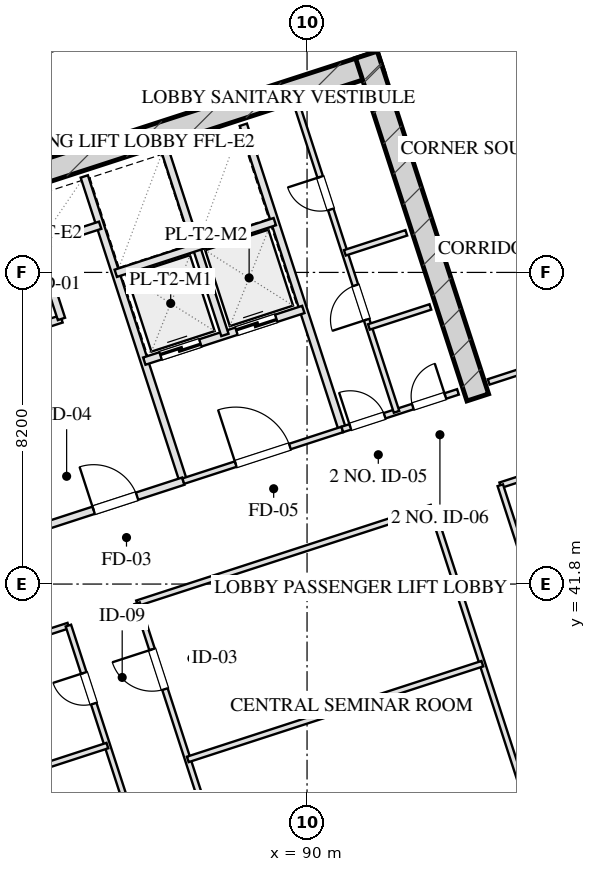
"""IFC4 building model, lengths in metres.
Left out: names, types, materials, properties, quantities, classifications, styles, units other than length and angle.
Written with IfcOpenShell. Run it as: python <this file> out.ifc"""

import sys

from ifc_helpers import new_model, si_unit, direction, frame, frame_2d, origin, origin_2d, place, context, subcontext, project, spatial, rectangle, hollow_rectangle, extrude, element, fill, save


model = new_model("IFC4")
c1 = context("Model", 3, precision=1e-05, world=origin(), true_north=direction((0.0, 1.0)))
c2 = subcontext(c1, "Body", "Model", "MODEL_VIEW")
j1 = project(units=[si_unit("LENGTHUNIT", "METRE"), si_unit("PLANEANGLEUNIT", "RADIAN")], contexts=[c1])
p1 = place(None, origin())
s1 = spatial("IfcSite", under=j1, at=p1, CompositionType="ELEMENT")
p2 = place(p1, origin())
s2 = spatial("IfcBuilding", under=s1, at=p2, CompositionType="ELEMENT")
p3 = place(p2, frame((0.0, 0.0, 180.55)))
s3 = spatial("IfcBuildingStorey", under=s2, at=p3, CompositionType="ELEMENT", Elevation=180.55)
p4 = place(p3, frame((76.344, 50.466, 0.0), z_axis=(0.0, 0.0, 1.0), x_axis=(0.951055727519, 0.309019421968, 0.0)))
e1 = element("IfcWall", 1, at=p4, inside=s3, PredefinedType="SHEAR", context=c2, shape_type="SweptSolid", body=[
    extrude(rectangle(XDim=16.4, YDim=0.6, at=frame_2d((8.2, 0.0))), origin(), (0.0, 0.0, 1.0), 3.45),
])
p5 = place(p3, frame((94.492, 46.71, 0.0), z_axis=(0.0, 0.0, 1.0), x_axis=(-0.309010370028, 0.95105866865, 0.0)))
e2 = element("IfcWall", 2, at=p5, inside=s3, PredefinedType="SHEAR", context=c2, shape_type="SweptSolid", body=[
    extrude(rectangle(XDim=9.48, YDim=0.6, at=frame_2d((4.74, 0.0))), origin(), (0.0, 0.0, 1.0), 3.45),
])
p6 = place(p3, frame((82.815, 56.112, 0.0), z_axis=(0.0, 0.0, 1.0), x_axis=(0.951056516295, 0.309016994375, 0.0)))
e3 = element("IfcColumn", 3, at=p6, inside=s3, PredefinedType="COLUMN", context=c2, shape_type="SweptSolid", body=[
    extrude(hollow_rectangle(XDim=0.8, YDim=0.8, WallThickness=0.028, at=origin_2d()), origin(), (0.0, 0.0, 1.0), 3.451),
])
p7 = place(p3, frame((70.092, 52.556, 0.0), z_axis=(0.0, 0.0, 1.0), x_axis=(0.951057580055, 0.30901372044, 0.0)))
e4 = element("IfcWall", 4, at=p7, inside=s3, PredefinedType="SOLIDWALL", context=c2, shape_type="SweptSolid", body=[
    extrude(rectangle(XDim=26.4, YDim=0.4, at=frame_2d((13.2, 0.0))), origin(), (0.0, 0.0, 1.0), 2.55),
])
p8 = place(p3, frame((86.743, 44.508, 0.0), z_axis=(0.0, 0.0, 1.0), x_axis=(-0.309016001439, 0.951056838919, 0.0)))
e5 = element("IfcWall", 5, at=p8, inside=s3, PredefinedType="PARTITIONING", context=c2, shape_type="SweptSolid", body=[
    extrude(rectangle(XDim=8.43, YDim=0.2, at=frame_2d((4.215, 0.0))), origin(), (0.0, 0.0, 1.0), 3.155),
])
p9 = place(p3, frame((83.101, 43.324, 0.0), z_axis=(0.0, 0.0, 1.0), x_axis=(0.951052804469, 0.309028417967, 0.0)))
e6 = element("IfcWall", 6, at=p9, inside=s3, PredefinedType="PARTITIONING", context=c2, shape_type="SweptSolid", body=[
    extrude(rectangle(XDim=3.83, YDim=0.2, at=frame_2d((1.915, 0.0))), origin(), (0.0, 0.0, 1.0), 3.155),
])
p10 = place(p9, frame((1.35, 0.0, 0.0)))
e7 = element("IfcOpeningElement", 7, at=p10, cuts=e6, PredefinedType="OPENING", context=c2, shape_type="SweptSolid", body=[
    extrude(rectangle(XDim=1.2, YDim=2.05, at=frame_2d((0.6, 1.025))), frame((0.0, 0.11, 0.0), z_axis=(0.0, -1.0, 0.0), x_axis=(1.0, 0.0, 0.0)), (0.0, 0.0, 1.0), 0.22),
])
p11 = place(p3, frame((81.54, 48.127, 0.0), z_axis=(0.0, 0.0, 1.0), x_axis=(0.951062257173, 0.308999325213, 0.0)))
e8 = element("IfcWall", 8, at=p11, inside=s3, PredefinedType="PARTITIONING", context=c2, shape_type="SweptSolid", body=[
    extrude(rectangle(XDim=2.1, YDim=0.2, at=frame_2d((1.05, 0.0))), origin(), (0.0, 0.0, 1.0), 3.155),
])
p12 = place(p11, frame((0.35, 0.0, 0.0)))
e9 = element("IfcOpeningElement", 9, at=p12, cuts=e8, PredefinedType="OPENING", context=c2, shape_type="SweptSolid", body=[
    extrude(rectangle(XDim=1.1, YDim=2.05, at=frame_2d((0.55, 1.025))), frame((0.0, 0.11, 0.0), z_axis=(0.0, -1.0, 0.0), x_axis=(1.0, 0.0, 0.0)), (0.0, 0.0, 1.0), 0.22),
])
p13 = place(p3, frame((83.538, 48.776, 0.0), z_axis=(0.0, 0.0, 1.0), x_axis=(-0.3089935693, 0.951064127245, 0.0)))
e10 = element("IfcWall", 10, at=p13, inside=s3, PredefinedType="PARTITIONING", context=c2, shape_type="SweptSolid", body=[
    extrude(rectangle(XDim=3.7, YDim=0.2, at=frame_2d((1.85, 0.0))), origin(), (0.0, 0.0, 1.0), 3.155),
])
p14 = place(p3, frame((82.91, 50.707, 0.0), z_axis=(0.0, 0.0, 1.0), x_axis=(0.951041328149, 0.309063734775, 0.0)))
e11 = element("IfcWall", 11, at=p14, inside=s3, PredefinedType="PARTITIONING", context=c2, shape_type="SweptSolid", body=[
    extrude(rectangle(XDim=1.73, YDim=0.2, at=frame_2d((0.865, 0.0))), origin(), (0.0, 0.0, 1.0), 3.155),
])
p15 = place(p3, frame((90.928, 45.868, 0.0), z_axis=(0.0, 0.0, 1.0), x_axis=(-0.309042196757, 0.951048327176, 0.0)))
e12 = element("IfcWall", 12, at=p15, inside=s3, PredefinedType="PARTITIONING", context=c2, shape_type="SweptSolid", body=[
    extrude(rectangle(XDim=8.43, YDim=0.2, at=frame_2d((4.215, 0.0))), origin(), (0.0, 0.0, 1.0), 3.155),
])
p16 = place(p3, frame((86.743, 44.508, 0.0), z_axis=(0.0, 0.0, 1.0), x_axis=(0.951063829732, 0.308994485023, 0.0)))
e13 = element("IfcWall", 13, at=p16, inside=s3, PredefinedType="PARTITIONING", context=c2, shape_type="SweptSolid", body=[
    extrude(rectangle(XDim=4.4, YDim=0.15, at=frame_2d((2.2, 0.0))), origin(), (0.0, 0.0, 1.0), 3.155),
])
p17 = place(p16, frame((1.45, 0.0, 0.0)))
e14 = element("IfcOpeningElement", 14, at=p17, cuts=e13, PredefinedType="OPENING", context=c2, shape_type="SweptSolid", body=[
    extrude(rectangle(XDim=1.5, YDim=2.05, at=frame_2d((0.75, 1.025))), frame((0.0, 0.085, 0.0), z_axis=(0.0, -1.0, 0.0), x_axis=(1.0, 0.0, 0.0)), (0.0, 0.0, 1.0), 0.17),
])
p18 = place(p3, frame((85.718, 47.666, 0.0), z_axis=(0.0, 0.0, 1.0), x_axis=(0.951058531764, 0.30901079133, 0.0)))
e15 = element("IfcWall", 15, at=p18, inside=s3, PredefinedType="PARTITIONING", context=c2, shape_type="SweptSolid", body=[
    extrude(rectangle(XDim=4.4, YDim=0.2, at=frame_2d((2.2, 0.0))), origin(), (0.0, 0.0, 1.0), 3.155),
])
p19 = place(p18, frame((0.45, 0.0, 0.0)))
e16 = element("IfcOpeningElement", 16, at=p19, cuts=e15, PredefinedType="OPENING", context=c2, shape_type="SweptSolid", body=[
    extrude(rectangle(XDim=1.1, YDim=2.05, at=frame_2d((0.55, 1.025))), frame((0.0, 0.11, 0.0), z_axis=(0.0, -1.0, 0.0), x_axis=(1.0, 0.0, 0.0)), (0.0, 0.0, 1.0), 0.22),
])
p20 = place(p18, frame((2.55, 0.0, 0.0)))
e17 = element("IfcOpeningElement", 17, at=p20, cuts=e15, PredefinedType="OPENING", context=c2, shape_type="SweptSolid", body=[
    extrude(rectangle(XDim=1.1, YDim=2.05, at=frame_2d((0.55, 1.025))), frame((0.0, 0.11, 0.0), z_axis=(0.0, -1.0, 0.0), x_axis=(1.0, 0.0, 0.0)), (0.0, 0.0, 1.0), 0.22),
])
p21 = place(p3, frame((87.838, 48.354, 0.0), z_axis=(0.0, 0.0, 1.0), x_axis=(-0.3090093719, 0.951058992953, 0.0)))
e18 = element("IfcWall", 18, at=p21, inside=s3, PredefinedType="PARTITIONING", context=c2, shape_type="SweptSolid", body=[
    extrude(rectangle(XDim=5.11, YDim=0.2, at=frame_2d((2.555, 0.0))), origin(), (0.0, 0.0, 1.0), 3.155),
])
p22 = place(p3, frame((84.967, 49.977, 0.0), z_axis=(0.0, 0.0, 1.0), x_axis=(0.951063829732, 0.308994485023, 0.0)))
e19 = element("IfcWall", 19, at=p22, inside=s3, PredefinedType="PARTITIONING", context=c2, shape_type="SweptSolid", body=[
    extrude(rectangle(XDim=4.4, YDim=0.2, at=frame_2d((2.2, 0.0))), origin(), (0.0, 0.0, 1.0), 3.155),
])
p23 = place(p3, frame((90.928, 45.868, 0.0), z_axis=(0.0, 0.0, 1.0), x_axis=(0.951059297078, 0.309008435874, 0.0)))
e20 = element("IfcWall", 20, at=p23, inside=s3, PredefinedType="PARTITIONING", context=c2, shape_type="SweptSolid", body=[
    extrude(rectangle(XDim=3.2, YDim=0.15, at=frame_2d((1.6, 0.0))), origin(), (0.0, 0.0, 1.0), 3.155),
])
p24 = place(p23, frame((0.22, 0.0, 0.0)))
e21 = element("IfcOpeningElement", 21, at=p24, cuts=e20, PredefinedType="OPENING", context=c2, shape_type="SweptSolid", body=[
    extrude(rectangle(XDim=0.95, YDim=2.05, at=frame_2d((0.475, 1.025))), frame((0.0, 0.085, 0.0), z_axis=(0.0, -1.0, 0.0), x_axis=(1.0, 0.0, 0.0)), (0.0, 0.0, 1.0), 0.17),
])
p25 = place(p23, frame((1.95, 0.0, 0.0)))
e22 = element("IfcOpeningElement", 22, at=p25, cuts=e20, PredefinedType="OPENING", context=c2, shape_type="SweptSolid", body=[
    extrude(rectangle(XDim=0.9, YDim=2.05, at=frame_2d((0.45, 1.025))), frame((0.0, 0.085, 0.0), z_axis=(0.0, -1.0, 0.0), x_axis=(1.0, 0.0, 0.0)), (0.0, 0.0, 1.0), 0.17),
])
p26 = place(p3, frame((92.355, 46.331, 0.0), z_axis=(0.0, 0.0, 1.0), x_axis=(-0.309007490203, 0.951059604335, 0.0)))
e23 = element("IfcWall", 23, at=p26, inside=s3, PredefinedType="PARTITIONING", context=c2, shape_type="SweptSolid", body=[
    extrude(rectangle(XDim=8.43, YDim=0.15, at=frame_2d((4.215, 0.0))), origin(), (0.0, 0.0, 1.0), 3.155),
])
p27 = place(p26, frame((2.55, 0.0, 0.0)))
e24 = element("IfcOpeningElement", 24, at=p27, cuts=e23, PredefinedType="OPENING", context=c2, shape_type="SweptSolid", body=[
    extrude(rectangle(XDim=0.95, YDim=2.05, at=frame_2d((0.475, 1.025))), frame((0.0, 0.085, 0.0), z_axis=(0.0, -1.0, 0.0), x_axis=(1.0, 0.0, 0.0)), (0.0, 0.0, 1.0), 0.17),
])
p28 = place(p26, frame((5.6, 0.0, 0.0)))
e25 = element("IfcOpeningElement", 25, at=p28, cuts=e23, PredefinedType="OPENING", context=c2, shape_type="SweptSolid", body=[
    extrude(rectangle(XDim=0.9, YDim=2.05, at=frame_2d((0.45, 1.025))), frame((0.0, 0.085, 0.0), z_axis=(0.0, -1.0, 0.0), x_axis=(1.0, 0.0, 0.0)), (0.0, 0.0, 1.0), 0.17),
])
p29 = place(p3, frame((90.995, 50.516, 0.0), z_axis=(0.0, 0.0, 1.0), x_axis=(0.951040401051, 0.309066587596, 0.0)))
e26 = element("IfcWall", 26, at=p29, inside=s3, PredefinedType="PARTITIONING", context=c2, shape_type="SweptSolid", body=[
    extrude(rectangle(XDim=1.7, YDim=0.15, at=frame_2d((0.85, 0.0))), origin(), (0.0, 0.0, 1.0), 3.155),
])
p30 = place(p3, frame((91.628, 48.566, 0.0), z_axis=(0.0, 0.0, 1.0), x_axis=(0.951054116971, 0.309024378638, 0.0)))
e27 = element("IfcWall", 27, at=p30, inside=s3, PredefinedType="PARTITIONING", context=c2, shape_type="SweptSolid", body=[
    extrude(rectangle(XDim=1.7, YDim=0.15, at=frame_2d((0.85, 0.0))), origin(), (0.0, 0.0, 1.0), 3.155),
])
p31 = place(p3, frame((94.78, 47.119, 0.0), z_axis=(0.0, 0.0, 1.0), x_axis=(0.951057811516, 0.309013008068, 0.0)))
e28 = element("IfcWall", 28, at=p31, inside=s3, PredefinedType="PARTITIONING", context=c2, shape_type="SweptSolid", body=[
    extrude(rectangle(XDim=6.8, YDim=0.15, at=frame_2d((3.4, 0.0))), origin(), (0.0, 0.0, 1.0), 3.155),
])
p32 = place(p31, frame((2.856, 0.0, 0.0)))
e29 = element("IfcOpeningElement", 29, at=p32, cuts=e28, PredefinedType="OPENING", context=c2, shape_type="SweptSolid", body=[
    extrude(rectangle(XDim=1.0, YDim=2.05, at=frame_2d((0.5, 1.025))), frame((0.0, 0.085, 0.0), z_axis=(0.0, -1.0, 0.0), x_axis=(1.0, 0.0, 0.0)), (0.0, 0.0, 1.0), 0.17),
])
p33 = place(p3, frame((72.783, 37.154, 0.0), z_axis=(0.0, 0.0, 1.0), x_axis=(0.951056999652, 0.309015506751, 0.0)))
e30 = element("IfcWall", 30, at=p33, inside=s3, PredefinedType="PARTITIONING", context=c2, shape_type="SweptSolid", body=[
    extrude(rectangle(XDim=11.5, YDim=0.15, at=frame_2d((5.75, 0.0))), origin(), (0.0, 0.0, 1.0), 3.155),
])
p34 = place(p3, frame((85.527, 41.295, 0.0), z_axis=(0.0, 0.0, 1.0), x_axis=(0.951055419664, 0.309020369437, 0.0)))
e31 = element("IfcWall", 31, at=p34, inside=s3, PredefinedType="PARTITIONING", context=c2, shape_type="SweptSolid", body=[
    extrude(rectangle(XDim=8.15, YDim=0.15, at=frame_2d((4.075, 0.0))), origin(), (0.0, 0.0, 1.0), 3.155),
])
p35 = place(p3, frame((95.085, 44.4, 0.0), z_axis=(0.0, 0.0, 1.0), x_axis=(0.95105749975, 0.309013967595, 0.0)))
e32 = element("IfcWall", 32, at=p35, inside=s3, PredefinedType="PARTITIONING", context=c2, shape_type="SweptSolid", body=[
    extrude(rectangle(XDim=7.35, YDim=0.15, at=frame_2d((3.675, 0.0))), origin(), (0.0, 0.0, 1.0), 3.155),
])
p36 = place(p3, frame((88.862, 24.882, 0.0), z_axis=(0.0, 0.0, 1.0), x_axis=(-0.309008771245, 0.951059188113, 0.0)))
e33 = element("IfcWall", 33, at=p36, inside=s3, PredefinedType="PARTITIONING", context=c2, shape_type="SweptSolid", body=[
    extrude(rectangle(XDim=16.64, YDim=0.15, at=frame_2d((8.32, 0.0))), origin(), (0.0, 0.0, 1.0), 3.155),
])
p37 = place(p36, frame((1.16, 0.0, 0.0)))
e34 = element("IfcOpeningElement", 34, at=p37, cuts=e33, PredefinedType="OPENING", context=c2, shape_type="SweptSolid", body=[
    extrude(rectangle(XDim=1.0, YDim=2.05, at=frame_2d((0.5, 1.025))), frame((0.0, 0.085, 0.0), z_axis=(0.0, -1.0, 0.0), x_axis=(1.0, 0.0, 0.0)), (0.0, 0.0, 1.0), 0.17),
])
p38 = place(p36, frame((5.48, 0.0, 0.0)))
e35 = element("IfcOpeningElement", 35, at=p38, cuts=e33, PredefinedType="OPENING", context=c2, shape_type="SweptSolid", body=[
    extrude(rectangle(XDim=1.05, YDim=2.05, at=frame_2d((0.525, 1.025))), frame((0.0, 0.085, 0.0), z_axis=(0.0, -1.0, 0.0), x_axis=(1.0, 0.0, 0.0)), (0.0, 0.0, 1.0), 0.17),
])
p39 = place(p36, frame((8.08, 0.0, 0.0)))
e36 = element("IfcOpeningElement", 36, at=p39, cuts=e33, PredefinedType="OPENING", context=c2, shape_type="SweptSolid", body=[
    extrude(rectangle(XDim=1.0, YDim=2.05, at=frame_2d((0.5, 1.025))), frame((0.0, 0.085, 0.0), z_axis=(0.0, -1.0, 0.0), x_axis=(1.0, 0.0, 0.0)), (0.0, 0.0, 1.0), 0.17),
])
p40 = place(p36, frame((10.92, 0.0, 0.0)))
e37 = element("IfcOpeningElement", 37, at=p40, cuts=e33, PredefinedType="OPENING", context=c2, shape_type="SweptSolid", body=[
    extrude(rectangle(XDim=1.0, YDim=2.05, at=frame_2d((0.5, 1.025))), frame((0.0, 0.085, 0.0), z_axis=(0.0, -1.0, 0.0), x_axis=(1.0, 0.0, 0.0)), (0.0, 0.0, 1.0), 0.17),
])
p41 = place(p36, frame((14.48, 0.0, 0.0)))
e38 = element("IfcOpeningElement", 38, at=p41, cuts=e33, PredefinedType="OPENING", context=c2, shape_type="SweptSolid", body=[
    extrude(rectangle(XDim=0.85, YDim=2.05, at=frame_2d((0.425, 1.025))), frame((0.0, 0.085, 0.0), z_axis=(0.0, -1.0, 0.0), x_axis=(1.0, 0.0, 0.0)), (0.0, 0.0, 1.0), 0.17),
])
p42 = place(p3, frame((90.669, 25.469, 0.0), z_axis=(0.0, 0.0, 1.0), x_axis=(-0.309022042254, 0.951054876125, 0.0)))
e39 = element("IfcWall", 39, at=p42, inside=s3, PredefinedType="PARTITIONING", context=c2, shape_type="SweptSolid", body=[
    extrude(rectangle(XDim=16.64, YDim=0.15, at=frame_2d((8.32, 0.0))), origin(), (0.0, 0.0, 1.0), 3.155),
])
p43 = place(p42, frame((1.944, 0.0, 0.0)))
e40 = element("IfcOpeningElement", 40, at=p43, cuts=e39, PredefinedType="OPENING", context=c2, shape_type="SweptSolid", body=[
    extrude(rectangle(XDim=1.1, YDim=2.05, at=frame_2d((0.55, 1.025))), frame((0.0, 0.085, 0.0), z_axis=(0.0, -1.0, 0.0), x_axis=(1.0, 0.0, 0.0)), (0.0, 0.0, 1.0), 0.17),
])
p44 = place(p42, frame((14.264, 0.0, 0.0)))
e41 = element("IfcOpeningElement", 41, at=p44, cuts=e39, PredefinedType="OPENING", context=c2, shape_type="SweptSolid", body=[
    extrude(rectangle(XDim=1.1, YDim=2.05, at=frame_2d((0.55, 1.025))), frame((0.0, 0.085, 0.0), z_axis=(0.0, -1.0, 0.0), x_axis=(1.0, 0.0, 0.0)), (0.0, 0.0, 1.0), 0.17),
])
p45 = place(p3, frame((98.42, 27.988, 0.0), z_axis=(0.0, 0.0, 1.0), x_axis=(-0.309004459387, 0.951060589068, 0.0)))
e42 = element("IfcWall", 42, at=p45, inside=s3, PredefinedType="PARTITIONING", context=c2, shape_type="SweptSolid", body=[
    extrude(rectangle(XDim=16.64, YDim=0.15, at=frame_2d((8.32, 0.0))), origin(), (0.0, 0.0, 1.0), 3.155),
])
p46 = place(p45, frame((7.68, 0.0, 0.0)))
e43 = element("IfcOpeningElement", 43, at=p46, cuts=e42, PredefinedType="OPENING", context=c2, shape_type="SweptSolid", body=[
    extrude(rectangle(XDim=1.1, YDim=2.05, at=frame_2d((0.55, 1.025))), frame((0.0, 0.085, 0.0), z_axis=(0.0, -1.0, 0.0), x_axis=(1.0, 0.0, 0.0)), (0.0, 0.0, 1.0), 0.17),
])
p47 = place(p3, frame((100.227, 28.575, 0.0), z_axis=(0.0, 0.0, 1.0), x_axis=(-0.30901773025, 0.951056277195, 0.0)))
e44 = element("IfcWall", 44, at=p47, inside=s3, PredefinedType="PARTITIONING", context=c2, shape_type="SweptSolid", body=[
    extrude(rectangle(XDim=16.64, YDim=0.15, at=frame_2d((8.32, 0.0))), origin(), (0.0, 0.0, 1.0), 3.155),
])
p48 = place(p47, frame((3.32, 0.0, 0.0)))
e45 = element("IfcOpeningElement", 45, at=p48, cuts=e44, PredefinedType="OPENING", context=c2, shape_type="SweptSolid", body=[
    extrude(rectangle(XDim=1.05, YDim=2.05, at=frame_2d((0.525, 1.025))), frame((0.0, 0.085, 0.0), z_axis=(0.0, -1.0, 0.0), x_axis=(1.0, 0.0, 0.0)), (0.0, 0.0, 1.0), 0.17),
])
p49 = place(p47, frame((11.64, 0.0, 0.0)))
e46 = element("IfcOpeningElement", 46, at=p49, cuts=e44, PredefinedType="OPENING", context=c2, shape_type="SweptSolid", body=[
    extrude(rectangle(XDim=1.0, YDim=2.05, at=frame_2d((0.5, 1.025))), frame((0.0, 0.085, 0.0), z_axis=(0.0, -1.0, 0.0), x_axis=(1.0, 0.0, 0.0)), (0.0, 0.0, 1.0), 0.17),
])
p50 = place(p3, frame((86.862, 37.186, 0.0), z_axis=(0.0, 0.0, 1.0), x_axis=(0.95106422313, 0.308993274169, 0.0)))
e47 = element("IfcWall", 47, at=p50, inside=s3, PredefinedType="PARTITIONING", context=c2, shape_type="SweptSolid", body=[
    extrude(rectangle(XDim=8.15, YDim=0.15, at=frame_2d((4.075, 0.0))), origin(), (0.0, 0.0, 1.0), 3.155),
])
p51 = place(p3, frame((73.809, 33.996, 0.0), z_axis=(0.0, 0.0, 1.0), x_axis=(0.951056999652, 0.309015506751, 0.0)))
e48 = element("IfcWall", 48, at=p51, inside=s3, PredefinedType="PARTITIONING", context=c2, shape_type="SweptSolid", body=[
    extrude(rectangle(XDim=11.5, YDim=0.15, at=frame_2d((5.75, 0.0))), origin(), (0.0, 0.0, 1.0), 3.155),
])
p52 = place(p10, origin())
e49 = element("IfcDoor", 49, at=p52, inside=s3, OperationType="SINGLE_SWING_LEFT", PredefinedType="DOOR", context=c2, shape_type="SweptSolid", body=[
    extrude(rectangle(XDim=1.2, YDim=2.05, at=frame_2d((0.6, 1.025))), frame((0.0, 0.025, 0.0), z_axis=(0.0, -1.0, 0.0), x_axis=(1.0, 0.0, 0.0)), (0.0, 0.0, 1.0), 0.05),
])
fill(e7, e49)
p53 = place(p17, origin())
e50 = element("IfcDoor", 50, at=p53, inside=s3, OperationType="SINGLE_SWING_LEFT", PredefinedType="DOOR", context=c2, shape_type="SweptSolid", body=[
    extrude(rectangle(XDim=1.5, YDim=2.05, at=frame_2d((0.75, 1.025))), frame((0.0, 0.025, 0.0), z_axis=(0.0, -1.0, 0.0), x_axis=(1.0, 0.0, 0.0)), (0.0, 0.0, 1.0), 0.05),
])
fill(e14, e50)
p54 = place(p19, origin())
e51 = element("IfcDoor", 51, at=p54, inside=s3, OperationType="DOUBLE_DOOR_SLIDING", PredefinedType="DOOR", context=c2, shape_type="SweptSolid", body=[
    extrude(rectangle(XDim=1.1, YDim=2.05, at=frame_2d((0.55, 1.025))), frame((0.0, 0.025, 0.0), z_axis=(0.0, -1.0, 0.0), x_axis=(1.0, 0.0, 0.0)), (0.0, 0.0, 1.0), 0.05),
])
fill(e16, e51)
p55 = place(p20, origin())
e52 = element("IfcDoor", 52, at=p55, inside=s3, OperationType="DOUBLE_DOOR_SLIDING", PredefinedType="DOOR", context=c2, shape_type="SweptSolid", body=[
    extrude(rectangle(XDim=1.1, YDim=2.05, at=frame_2d((0.55, 1.025))), frame((0.0, 0.025, 0.0), z_axis=(0.0, -1.0, 0.0), x_axis=(1.0, 0.0, 0.0)), (0.0, 0.0, 1.0), 0.05),
])
fill(e17, e52)
p56 = place(p24, origin())
e53 = element("IfcDoor", 53, at=p56, inside=s3, OperationType="SINGLE_SWING_LEFT", PredefinedType="DOOR", context=c2, shape_type="SweptSolid", body=[
    extrude(rectangle(XDim=0.95, YDim=2.05, at=frame_2d((0.475, 1.025))), frame((0.0, 0.025, 0.0), z_axis=(0.0, -1.0, 0.0), x_axis=(1.0, 0.0, 0.0)), (0.0, 0.0, 1.0), 0.05),
])
fill(e21, e53)
p57 = place(p25, origin())
e54 = element("IfcDoor", 54, at=p57, inside=s3, OperationType="SINGLE_SWING_RIGHT", PredefinedType="DOOR", context=c2, shape_type="SweptSolid", body=[
    extrude(rectangle(XDim=0.9, YDim=2.05, at=frame_2d((0.45, 1.025))), frame((0.0, 0.025, 0.0), z_axis=(0.0, -1.0, 0.0), x_axis=(1.0, 0.0, 0.0)), (0.0, 0.0, 1.0), 0.05),
])
fill(e22, e54)
p58 = place(p27, origin())
e55 = element("IfcDoor", 55, at=p58, inside=s3, OperationType="SINGLE_SWING_LEFT", PredefinedType="DOOR", context=c2, shape_type="SweptSolid", body=[
    extrude(rectangle(XDim=0.95, YDim=2.05, at=frame_2d((0.475, 1.025))), frame((0.0, 0.025, 0.0), z_axis=(0.0, -1.0, 0.0), x_axis=(1.0, 0.0, 0.0)), (0.0, 0.0, 1.0), 0.05),
])
fill(e24, e55)
p59 = place(p28, origin())
e56 = element("IfcDoor", 56, at=p59, inside=s3, OperationType="SINGLE_SWING_RIGHT", PredefinedType="DOOR", context=c2, shape_type="SweptSolid", body=[
    extrude(rectangle(XDim=0.9, YDim=2.05, at=frame_2d((0.45, 1.025))), frame((0.0, 0.025, 0.0), z_axis=(0.0, -1.0, 0.0), x_axis=(1.0, 0.0, 0.0)), (0.0, 0.0, 1.0), 0.05),
])
fill(e25, e56)
p60 = place(p41, origin())
e57 = element("IfcDoor", 57, at=p60, inside=s3, OperationType="SINGLE_SWING_RIGHT", PredefinedType="DOOR", context=c2, shape_type="SweptSolid", body=[
    extrude(rectangle(XDim=0.85, YDim=2.05, at=frame_2d((0.425, 1.025))), frame((0.0, 0.025, 0.0), z_axis=(0.0, -1.0, 0.0), x_axis=(1.0, 0.0, 0.0)), (0.0, 0.0, 1.0), 0.05),
])
fill(e38, e57)
p61 = place(p44, origin())
e58 = element("IfcDoor", 58, at=p61, inside=s3, OperationType="SINGLE_SWING_RIGHT", PredefinedType="DOOR", context=c2, shape_type="SweptSolid", body=[
    extrude(rectangle(XDim=1.1, YDim=2.05, at=frame_2d((0.55, 1.025))), frame((0.0, 0.025, 0.0), z_axis=(0.0, -1.0, 0.0), x_axis=(1.0, 0.0, 0.0)), (0.0, 0.0, 1.0), 0.05),
])
fill(e41, e58)
save(model, sys.argv[1])
